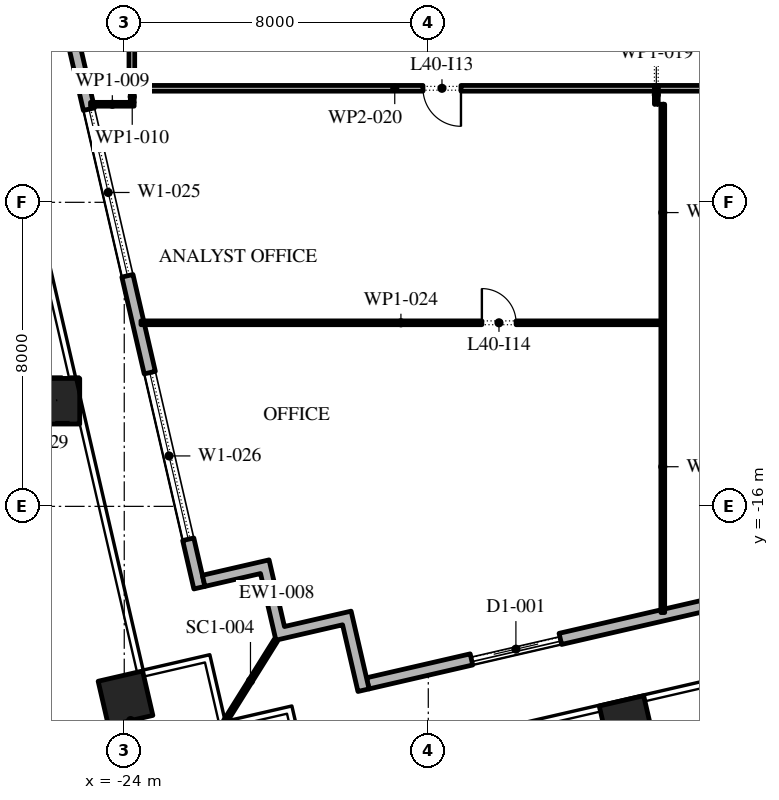
"""IFC4 building model, lengths in metres.
Left out: names, types, materials, properties, quantities, classifications, styles, units other than length and angle.
Written with IfcOpenShell. Run it as: python <this file> out.ifc"""

import sys

from ifc_helpers import new_model, si_unit, direction, frame, frame_2d, origin, origin_2d, place, context, subcontext, project, spatial, polyline, rectangle, outline, extrude, element, fill, save


model = new_model("IFC4")
c1 = context("Model", 3, precision=1e-05, world=origin(), true_north=direction((0.0, 1.0)))
c2 = subcontext(c1, "Body", "Model", "MODEL_VIEW")
j1 = project(units=[si_unit("LENGTHUNIT", "METRE"), si_unit("PLANEANGLEUNIT", "RADIAN")], contexts=[c1])
p1 = place(None, origin())
s1 = spatial("IfcSite", under=j1, at=p1, CompositionType="ELEMENT")
p2 = place(p1, origin())
s2 = spatial("IfcBuilding", under=s1, at=p2, CompositionType="ELEMENT")
p3 = place(p2, frame((0.0, 0.0, 184.2)))
s3 = spatial("IfcBuildingStorey", under=s2, at=p3, CompositionType="ELEMENT", Elevation=184.2)
p4 = place(p3, frame((-10.782, -21.702, 0.0), z_axis=(0.0, 0.0, 1.0), x_axis=(0.974370064785, 0.224951054344, 0.0)))
e1 = element("IfcColumn", 1, at=p4, inside=s3, PredefinedType="COLUMN", context=c2, shape_type="SweptSolid", body=[
    extrude(rectangle(XDim=1.2, YDim=1.2, at=origin_2d()), origin(), (0.0, 0.0, 1.0), 4.2),
])
p5 = place(p3, frame((-25.772, -13.234, 0.0), z_axis=(-0.002731884952, 0.01168316756, 0.999928017609), x_axis=(-0.973733900744, -0.227689021567, 0.0)))
e2 = element("IfcColumn", 2, at=p5, inside=s3, PredefinedType="COLUMN", context=c2, shape_type="SweptSolid", body=[
    extrude(rectangle(XDim=1.2, YDim=1.2, at=origin_2d()), origin(), (0.0, 0.0, 1.0), 4.2),
])
p6 = place(p3, frame((-23.967, -21.051, 0.0), z_axis=(0.0, 0.0, 1.0), x_axis=(0.974370064785, 0.224951054344, 0.0)))
e3 = element("IfcColumn", 3, at=p6, inside=s3, PredefinedType="COLUMN", context=c2, shape_type="SweptSolid", body=[
    extrude(rectangle(XDim=1.2, YDim=1.2, at=origin_2d()), origin(), (0.0, 0.0, 1.0), 4.2),
])
p7 = place(p3, frame((-17.592, -20.657, 0.0), z_axis=(0.0, 0.0, 1.0), x_axis=(0.974370243697, 0.224950279389, 0.0)))
e4 = element("IfcWall", 4, at=p7, inside=s3, PredefinedType="STANDARD", context=c2, shape_type="SweptSolid", body=[
    extrude(rectangle(XDim=49.5, YDim=0.3, at=frame_2d((24.75, 0.0))), origin(), (0.0, 0.0, 1.0), 4.0),
])
p8 = place(p7, frame((2.8, 0.0, 0.0)))
e5 = element("IfcOpeningElement", 5, at=p8, cuts=e4, PredefinedType="OPENING", context=c2, shape_type="SweptSolid", body=[
    extrude(rectangle(XDim=2.4, YDim=3.5, at=frame_2d((1.2, 1.75))), frame((0.0, 0.16, 0.0), z_axis=(0.0, -1.0, 0.0), x_axis=(1.0, 0.0, 0.0)), (0.0, 0.0, 1.0), 0.32),
])
p9 = place(p7, frame((9.9, 0.0, 0.45)))
e6 = element("IfcOpeningElement", 6, at=p9, cuts=e4, PredefinedType="OPENING", context=c2, shape_type="SweptSolid", body=[
    extrude(rectangle(XDim=4.5, YDim=2.575, at=frame_2d((2.25, 1.288))), frame((0.0, 0.16, 0.0), z_axis=(0.0, -1.0, 0.0), x_axis=(1.0, 0.0, 0.0)), (0.0, 0.0, 1.0), 0.32),
])
p10 = place(p7, frame((18.2, 0.0, 0.45)))
e7 = element("IfcOpeningElement", 7, at=p10, cuts=e4, PredefinedType="OPENING", context=c2, shape_type="SweptSolid", body=[
    extrude(rectangle(XDim=4.5, YDim=3.05, at=frame_2d((2.25, 1.525))), frame((0.0, 0.16, 0.0), z_axis=(0.0, -1.0, 0.0), x_axis=(1.0, 0.0, 0.0)), (0.0, 0.0, 1.0), 0.32),
])
p11 = place(p7, frame((26.5, 0.0, 0.45)))
e8 = element("IfcOpeningElement", 8, at=p11, cuts=e4, PredefinedType="OPENING", context=c2, shape_type="SweptSolid", body=[
    extrude(rectangle(XDim=4.5, YDim=2.75, at=frame_2d((2.25, 1.375))), frame((0.0, 0.16, 0.0), z_axis=(0.0, -1.0, 0.0), x_axis=(1.0, 0.0, 0.0)), (0.0, 0.0, 1.0), 0.32),
])
p12 = place(p7, frame((35.85, 0.0, 0.0)))
e9 = element("IfcOpeningElement", 9, at=p12, cuts=e4, PredefinedType="OPENING", context=c2, shape_type="SweptSolid", body=[
    extrude(rectangle(XDim=2.4, YDim=3.5, at=frame_2d((1.2, 1.75))), frame((0.0, 0.16, 0.0), z_axis=(0.0, -1.0, 0.0), x_axis=(1.0, 0.0, 0.0)), (0.0, 0.0, 1.0), 0.32),
])
p13 = place(p7, frame((43.1, 0.0, 0.45)))
e10 = element("IfcOpeningElement", 10, at=p13, cuts=e4, PredefinedType="OPENING", context=c2, shape_type="SweptSolid", body=[
    extrude(rectangle(XDim=4.5, YDim=2.875, at=frame_2d((2.25, 1.438))), frame((0.0, 0.16, 0.0), z_axis=(0.0, -1.0, 0.0), x_axis=(1.0, 0.0, 0.0)), (0.0, 0.0, 1.0), 0.32),
])
p14 = place(p3, frame((-33.157, 30.092, 0.0), z_axis=(0.0, 0.0, 1.0), x_axis=(0.224950279389, -0.974370243697, 0.0)))
e11 = element("IfcWall", 11, at=p14, inside=s3, PredefinedType="STANDARD", context=c2, shape_type="SweptSolid", body=[
    extrude(rectangle(XDim=49.5, YDim=0.3, at=frame_2d((24.75, 0.0))), origin(), (0.0, 0.0, 1.0), 4.0),
])
p15 = place(p14, frame((2.207, 0.0, 0.0)))
e12 = element("IfcOpeningElement", 12, at=p15, cuts=e11, PredefinedType="OPENING", context=c2, shape_type="SweptSolid", body=[
    extrude(rectangle(XDim=2.4, YDim=3.5, at=frame_2d((1.2, 1.75))), frame((0.0, 0.16, 0.0), z_axis=(0.0, -1.0, 0.0), x_axis=(1.0, 0.0, 0.0)), (0.0, 0.0, 1.0), 0.32),
])
p16 = place(p14, frame((8.121, 0.0, 0.45)))
e13 = element("IfcOpeningElement", 13, at=p16, cuts=e11, PredefinedType="OPENING", context=c2, shape_type="SweptSolid", body=[
    extrude(rectangle(XDim=4.5, YDim=2.825, at=frame_2d((2.25, 1.413))), frame((0.0, 0.16, 0.0), z_axis=(0.0, -1.0, 0.0), x_axis=(1.0, 0.0, 0.0)), (0.0, 0.0, 1.0), 0.32),
])
p17 = place(p14, frame((15.236, 0.0, 0.45)))
e14 = element("IfcOpeningElement", 14, at=p17, cuts=e11, PredefinedType="OPENING", context=c2, shape_type="SweptSolid", body=[
    extrude(rectangle(XDim=4.5, YDim=2.95, at=frame_2d((2.25, 1.475))), frame((0.0, 0.16, 0.0), z_axis=(0.0, -1.0, 0.0), x_axis=(1.0, 0.0, 0.0)), (0.0, 0.0, 1.0), 0.32),
])
p18 = place(p14, frame((22.35, 0.0, 0.45)))
e15 = element("IfcOpeningElement", 15, at=p18, cuts=e11, PredefinedType="OPENING", context=c2, shape_type="SweptSolid", body=[
    extrude(rectangle(XDim=4.5, YDim=3.0, at=frame_2d((2.25, 1.5))), frame((0.0, 0.16, 0.0), z_axis=(0.0, -1.0, 0.0), x_axis=(1.0, 0.0, 0.0)), (0.0, 0.0, 1.0), 0.32),
])
p19 = place(p14, frame((30.514, 0.0, 0.0)))
e16 = element("IfcOpeningElement", 16, at=p19, cuts=e11, PredefinedType="OPENING", context=c2, shape_type="SweptSolid", body=[
    extrude(rectangle(XDim=2.4, YDim=3.5, at=frame_2d((1.2, 1.75))), frame((0.0, 0.16, 0.0), z_axis=(0.0, -1.0, 0.0), x_axis=(1.0, 0.0, 0.0)), (0.0, 0.0, 1.0), 0.32),
])
p20 = place(p14, frame((36.579, 0.0, 0.45)))
e17 = element("IfcOpeningElement", 17, at=p20, cuts=e11, PredefinedType="OPENING", context=c2, shape_type="SweptSolid", body=[
    extrude(rectangle(XDim=4.5, YDim=3.05, at=frame_2d((2.25, 1.525))), frame((0.0, 0.16, 0.0), z_axis=(0.0, -1.0, 0.0), x_axis=(1.0, 0.0, 0.0)), (0.0, 0.0, 1.0), 0.32),
])
p21 = place(p14, frame((43.693, 0.0, 0.45)))
e18 = element("IfcOpeningElement", 18, at=p21, cuts=e11, PredefinedType="OPENING", context=c2, shape_type="SweptSolid", body=[
    extrude(rectangle(XDim=4.5, YDim=3.05, at=frame_2d((2.25, 1.525))), frame((0.0, 0.16, 0.0), z_axis=(0.0, -1.0, 0.0), x_axis=(1.0, 0.0, 0.0)), (0.0, 0.0, 1.0), 0.32),
])
p22 = place(p3, origin())
e19 = element("IfcWall", 19, at=p22, inside=s3, PredefinedType="STANDARD", context=c2, shape_type="SweptSolid", body=[
    extrude(outline(polyline([(-18.256, -19.117), (-20.01, -19.522), (-20.414, -17.768), (-21.876, -18.105), (-21.943, -17.813), (-20.19, -17.408), (-19.785, -19.162), (-18.031, -18.757), (-17.558, -20.803), (-17.851, -20.871), (-18.256, -19.117)])), origin(), (0.0, 0.0, 1.0), 4.0),
])
p23 = place(p3, frame((-20.01, -19.522, -0.05), z_axis=(0.0, 0.0, 1.0), x_axis=(-0.529920736377, -0.848047176257, 0.0)))
e20 = element("IfcWall", 20, at=p23, inside=s3, PredefinedType="STANDARD", context=c2, shape_type="SweptSolid", body=[
    extrude(rectangle(XDim=2.526, YDim=0.1, at=frame_2d((1.263, 0.0))), origin(), (0.0, 0.0, 1.0), 4.05),
])
p24 = place(p3, frame((-23.8, -5.075, 0.0), z_axis=(0.0, 0.0, 1.0), x_axis=(0.0, 1.0, 0.0)))
e21 = element("IfcWall", 21, at=p24, inside=s3, PredefinedType="PARTITIONING", context=c2, shape_type="SweptSolid", body=[
    extrude(rectangle(XDim=14.745, YDim=0.15, at=frame_2d((7.373, 0.0))), origin(), (0.0, 0.0, 1.0), 4.0),
])
p25 = place(p24, frame((5.545, 0.0, 0.0)))
e22 = element("IfcOpeningElement", 22, at=p25, cuts=e21, PredefinedType="OPENING", context=c2, shape_type="SweptSolid", body=[
    extrude(rectangle(XDim=1.0, YDim=2.1, at=frame_2d((0.5, 1.05))), frame((0.0, 0.085, 0.0), z_axis=(0.0, -1.0, 0.0), x_axis=(1.0, 0.0, 0.0)), (0.0, 0.0, 1.0), 0.17),
])
p26 = place(p3, frame((-23.74, -5.42, 0.0), z_axis=(0.0, 0.0, 1.0), x_axis=(-1.0, 0.0, 0.0)))
e23 = element("IfcWall", 23, at=p26, inside=s3, PredefinedType="PARTITIONING", context=c2, shape_type="SweptSolid", body=[
    extrude(rectangle(XDim=1.147, YDim=0.1, at=frame_2d((0.573, 0.0))), origin(), (0.0, 0.0, 1.0), 4.0),
])
p27 = place(p3, frame((-23.79, -5.075, 0.0), z_axis=(0.0, 0.0, 1.0), x_axis=(0.0, -1.0, 0.0)))
e24 = element("IfcWall", 24, at=p27, inside=s3, PredefinedType="PARTITIONING", context=c2, shape_type="SweptSolid", body=[
    extrude(rectangle(XDim=0.295, YDim=0.1, at=frame_2d((0.147, 0.0))), origin(), (0.0, 0.0, 1.0), 4.0),
])
p28 = place(p3, frame((-10.0, -5.42, 0.0), z_axis=(0.0, 0.0, 1.0), x_axis=(0.0, 1.0, 0.0)))
e25 = element("IfcWall", 25, at=p28, inside=s3, PredefinedType="PARTITIONING", context=c2, shape_type="SweptSolid", body=[
    extrude(rectangle(XDim=0.495, YDim=0.1, at=frame_2d((0.248, 0.0))), origin(), (0.0, 0.0, 1.0), 4.0),
])
p29 = place(p3, frame((-10.05, -5.0, 0.0), z_axis=(0.0, 0.0, 1.0), x_axis=(-1.0, 0.0, 0.0)))
e26 = element("IfcWall", 26, at=p29, inside=s3, PredefinedType="PARTITIONING", context=c2, shape_type="SweptSolid", body=[
    extrude(rectangle(XDim=13.665, YDim=0.15, at=frame_2d((6.833, 0.0))), origin(), (0.0, 0.0, 1.0), 4.0),
])
p30 = place(p29, frame((5.09, 0.0, 0.0)))
e27 = element("IfcOpeningElement", 27, at=p30, cuts=e26, PredefinedType="OPENING", context=c2, shape_type="SweptSolid", body=[
    extrude(rectangle(XDim=1.0, YDim=2.1, at=frame_2d((0.5, 1.05))), frame((0.0, 0.085, 0.0), z_axis=(0.0, -1.0, 0.0), x_axis=(1.0, 0.0, 0.0)), (0.0, 0.0, 1.0), 0.17),
])
p31 = place(p3, frame((-9.83, -18.794, 0.0), z_axis=(0.0, 0.0, 1.0), x_axis=(0.0, 1.0, 0.0)))
e28 = element("IfcWall", 28, at=p31, inside=s3, PredefinedType="PARTITIONING", context=c2, shape_type="SweptSolid", body=[
    extrude(rectangle(XDim=7.674, YDim=0.1, at=frame_2d((3.837, 0.0))), origin(), (0.0, 0.0, 1.0), 4.0),
])
p32 = place(p3, frame((-9.88, -11.17, 0.0), z_axis=(0.0, 0.0, 1.0), x_axis=(-1.0, 0.0, 0.0)))
e29 = element("IfcWall", 29, at=p32, inside=s3, PredefinedType="PARTITIONING", context=c2, shape_type="SweptSolid", body=[
    extrude(rectangle(XDim=13.68, YDim=0.1, at=frame_2d((6.84, 0.0))), origin(), (0.0, 0.0, 1.0), 4.0),
])
p33 = place(p32, frame((3.81, 0.0, 0.0)))
e30 = element("IfcOpeningElement", 30, at=p33, cuts=e29, PredefinedType="OPENING", context=c2, shape_type="SweptSolid", body=[
    extrude(rectangle(XDim=0.9, YDim=2.1, at=frame_2d((0.45, 1.05))), frame((0.0, 0.06, 0.0), z_axis=(0.0, -1.0, 0.0), x_axis=(1.0, 0.0, 0.0)), (0.0, 0.0, 1.0), 0.12),
])
p34 = place(p3, frame((-9.83, -11.12, 0.0), z_axis=(0.0, 0.0, 1.0), x_axis=(0.0, 1.0, 0.0)))
e31 = element("IfcWall", 31, at=p34, inside=s3, PredefinedType="PARTITIONING", context=c2, shape_type="SweptSolid", body=[
    extrude(rectangle(XDim=5.7, YDim=0.1, at=frame_2d((2.85, 0.0))), origin(), (0.0, 0.0, 1.0), 4.0),
])
p35 = place(p3, frame((-1.065, -5.0, 0.0), z_axis=(0.0, 0.0, 1.0), x_axis=(-1.0, 0.0, 0.0)))
e32 = element("IfcWall", 32, at=p35, inside=s3, PredefinedType="PARTITIONING", context=c2, shape_type="SweptSolid", body=[
    extrude(rectangle(XDim=8.885, YDim=0.15, at=frame_2d((4.442, 0.0))), origin(), (0.0, 0.0, 1.0), 4.0),
])
p36 = place(p8, origin())
e33 = element("IfcDoor", 33, at=p36, inside=s3, OperationType="DOUBLE_DOOR_SLIDING", PredefinedType="DOOR", context=c2, shape_type="SweptSolid", body=[
    extrude(rectangle(XDim=2.4, YDim=3.5, at=frame_2d((1.2, 1.75))), frame((0.0, 0.025, 0.0), z_axis=(0.0, -1.0, 0.0), x_axis=(1.0, 0.0, 0.0)), (0.0, 0.0, 1.0), 0.05),
])
fill(e5, e33)
p37 = place(p20, origin())
e34 = element("IfcWindow", 34, at=p37, inside=s3, PartitioningType="DOUBLE_PANEL_VERTICAL", PredefinedType="WINDOW", context=c2, shape_type="SweptSolid", body=[
    extrude(rectangle(XDim=4.5, YDim=3.05, at=frame_2d((2.25, 1.525))), frame((0.0, 0.03, 0.0), z_axis=(0.0, -1.0, 0.0), x_axis=(1.0, 0.0, 0.0)), (0.0, 0.0, 1.0), 0.06),
])
fill(e17, e34)
p38 = place(p21, origin())
e35 = element("IfcWindow", 35, at=p38, inside=s3, PartitioningType="DOUBLE_PANEL_VERTICAL", PredefinedType="WINDOW", context=c2, shape_type="SweptSolid", body=[
    extrude(rectangle(XDim=4.5, YDim=3.05, at=frame_2d((2.25, 1.525))), frame((0.0, 0.03, 0.0), z_axis=(0.0, -1.0, 0.0), x_axis=(1.0, 0.0, 0.0)), (0.0, 0.0, 1.0), 0.06),
])
fill(e18, e35)
p39 = place(p30, origin())
e36 = element("IfcDoor", 36, at=p39, inside=s3, OperationType="SINGLE_SWING_RIGHT", PredefinedType="DOOR", context=c2, shape_type="SweptSolid", body=[
    extrude(rectangle(XDim=1.0, YDim=2.1, at=frame_2d((0.5, 1.05))), frame((0.0, 0.025, 0.0), z_axis=(0.0, -1.0, 0.0), x_axis=(1.0, 0.0, 0.0)), (0.0, 0.0, 1.0), 0.05),
])
fill(e27, e36)
p40 = place(p33, frame((0.9, 0.0, 0.0), z_axis=(0.0, 0.0, 1.0), x_axis=(-1.0, 0.0, 0.0)))
e37 = element("IfcDoor", 37, at=p40, inside=s3, OperationType="SINGLE_SWING_RIGHT", PredefinedType="DOOR", context=c2, shape_type="SweptSolid", body=[
    extrude(rectangle(XDim=0.9, YDim=2.1, at=frame_2d((0.45, 1.05))), frame((0.0, 0.025, 0.0), z_axis=(0.0, -1.0, 0.0), x_axis=(1.0, 0.0, 0.0)), (0.0, 0.0, 1.0), 0.05),
])
fill(e30, e37)
save(model, sys.argv[1])
